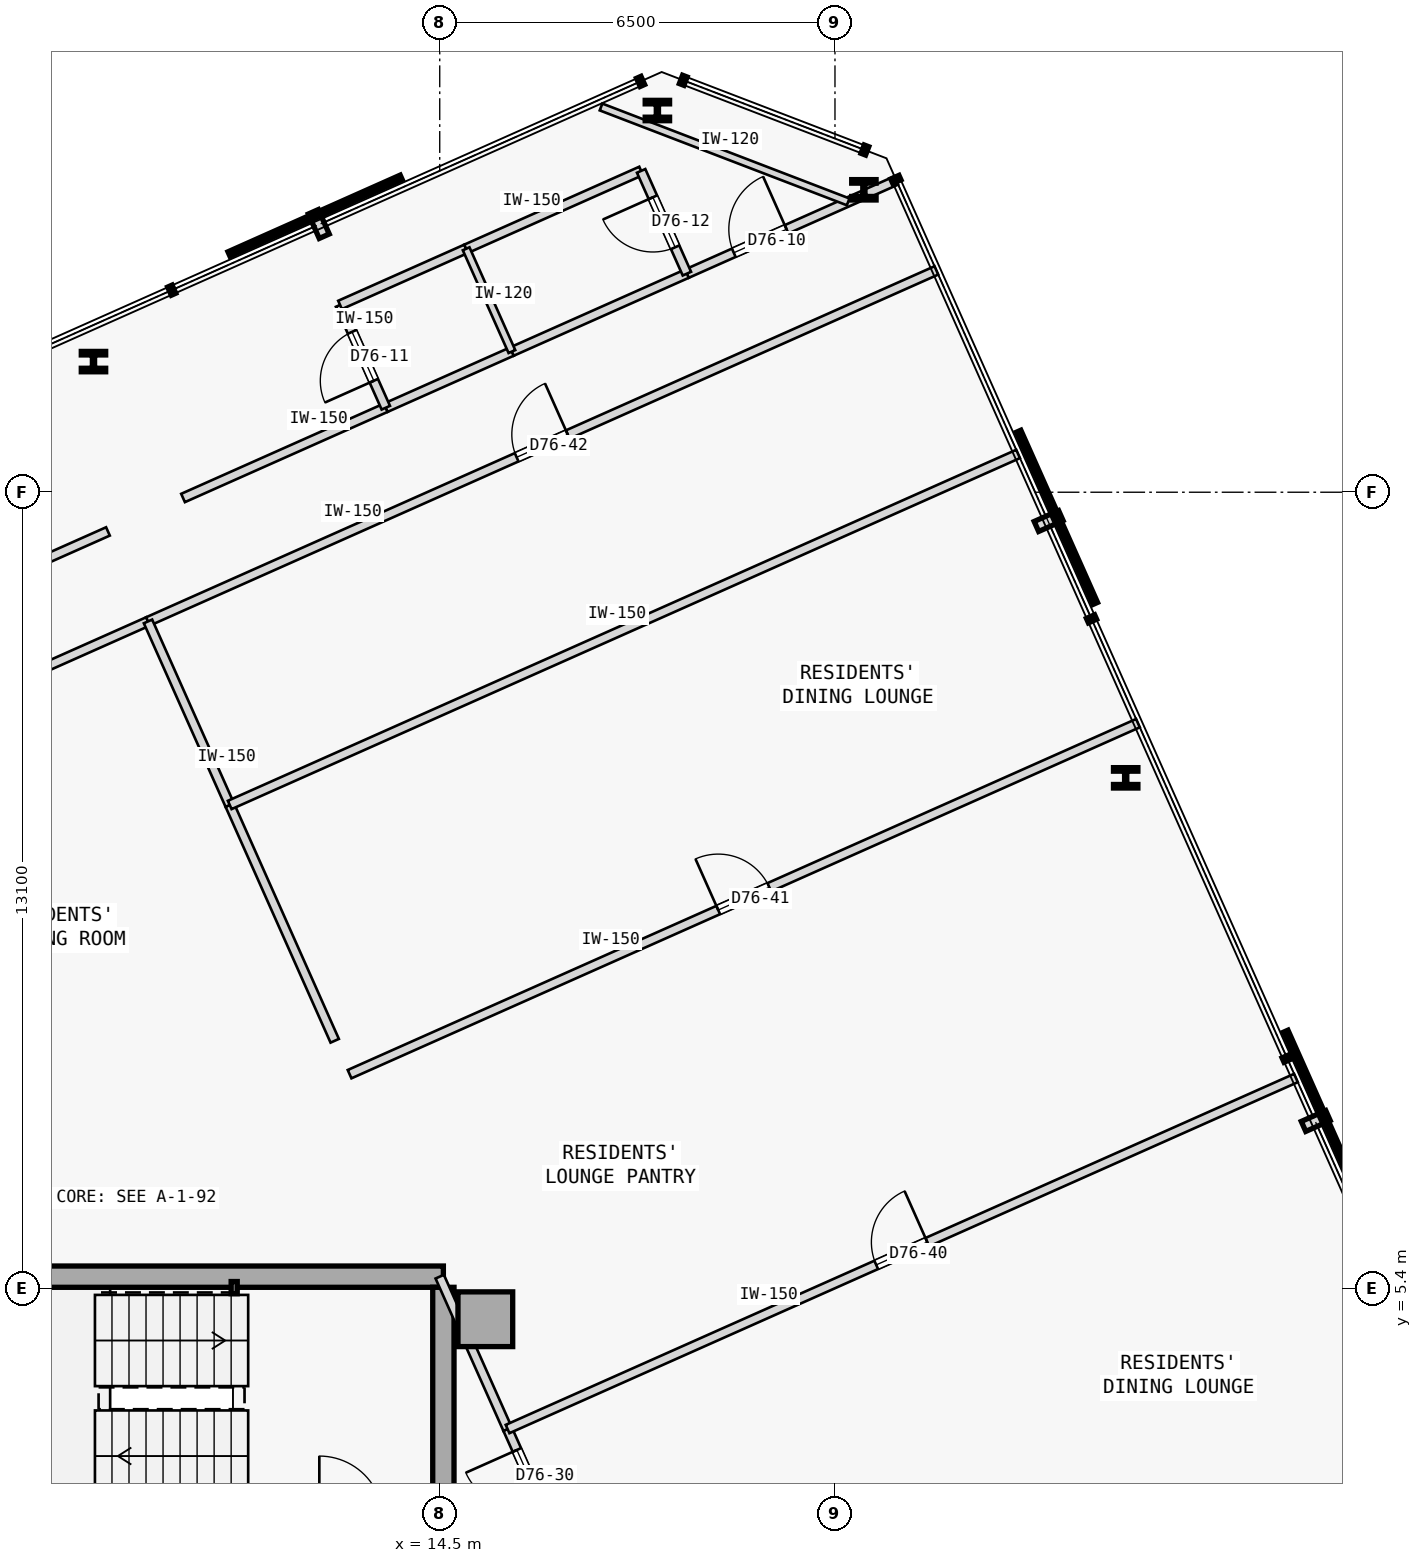
"""IFC4 building model, lengths in metres.
Left out: names, types, materials, properties, quantities, classifications, styles, units other than length and angle.
Written with IfcOpenShell. Run it as: python <this file> out.ifc"""

import sys

from ifc_helpers import new_model, si_unit, direction, frame, frame_2d, origin, origin_2d, place, context, subcontext, project, spatial, rectangle, hollow_rectangle, i_section, extrude, element, fill, save


model = new_model("IFC4")
c1 = context("Model", 3, precision=1e-05, world=origin(), true_north=direction((0.0, 1.0)))
c2 = subcontext(c1, "Body", "Model", "MODEL_VIEW")
j1 = project(units=[si_unit("LENGTHUNIT", "METRE"), si_unit("PLANEANGLEUNIT", "RADIAN")], contexts=[c1])
p1 = place(None, origin())
s1 = spatial("IfcSite", under=j1, at=p1, CompositionType="ELEMENT")
p2 = place(p1, origin())
s2 = spatial("IfcBuilding", under=s1, at=p2, CompositionType="ELEMENT")
p3 = place(p2, frame((0.0, 0.0, 285.25)))
s3 = spatial("IfcBuildingStorey", under=s2, at=p3, CompositionType="ELEMENT", Elevation=285.25)
p4 = place(p3, frame((15.25, 4.9, 0.0), z_axis=(0.0, 0.0, 1.0), x_axis=(1.0, 0.0, 0.0)))
e1 = element("IfcColumn", 1, at=p4, inside=s3, PredefinedType="COLUMN", context=c2, shape_type="SweptSolid", body=[
    extrude(rectangle(XDim=0.9, YDim=0.9, at=origin_2d()), origin(), (0.0, 0.0, 1.0), 3.35),
])
p5 = place(p3, frame((3.15, 5.6, 0.0), z_axis=(0.0, 0.0, 1.0), x_axis=(1.0, 0.0, 0.0)))
e2 = element("IfcWall", 2, at=p5, inside=s3, PredefinedType="SHEAR", context=c2, shape_type="SweptSolid", body=[
    extrude(rectangle(XDim=11.41, YDim=0.35, at=frame_2d((5.705, 0.0))), origin(), (0.0, 0.0, 1.0), 3.125),
])
p6 = place(p3, frame((14.56, -5.425, 0.0), z_axis=(0.0, 0.0, 1.0), x_axis=(0.0, 1.0, 0.0)))
e3 = element("IfcWall", 3, at=p6, inside=s3, PredefinedType="SHEAR", context=c2, shape_type="SweptSolid", body=[
    extrude(rectangle(XDim=10.85, YDim=0.35, at=frame_2d((5.425, 0.0))), origin(), (0.0, 0.0, 1.0), 3.125),
])
p7 = place(p3, frame((11.12, 5.42, 0.0), z_axis=(0.0, 0.0, 1.0), x_axis=(1.0, 0.0, 0.0)))
e4 = element("IfcColumn", 4, at=p7, inside=s3, PredefinedType="COLUMN", context=c2, shape_type="SweptSolid", body=[
    extrude(hollow_rectangle(XDim=0.1, YDim=0.2, WallThickness=0.008, at=origin_2d()), origin(), (0.0, 0.0, 1.0), 3.35),
])
for number, where, z_axis, x_axis in (
    (5, (25.781, 13.803, 0.0), (0.0, 0.0, 1.0), (1.0, 0.0, 0.0)),
    (6, (21.476, 23.473, 0.0), (0.0, 0.0, 1.0), (1.0, 0.0, 0.0)),
    (7, (18.08, 24.777, 0.0), (0.0, 0.0, 1.0), (1.0, 0.0, 0.0)),
    (8, (8.806, 20.648, 0.0), (0.0, 0.0, 1.0), (1.0, 0.0, 0.0)),
):
    element("IfcColumn", number, at=place(p3, frame(where, z_axis=z_axis, x_axis=x_axis)), inside=s3, PredefinedType="COLUMN", context=c2, shape_type="SweptSolid", body=[
        extrude(i_section(OverallWidth=0.401, OverallDepth=0.335, WebThickness=0.036, FlangeThickness=0.058, FilletRadius=0.015, at=origin_2d()), origin(), (0.0, 0.0, 1.0), 3.35),
    ])
p8 = place(p3, frame((10.279, 18.405, 0.0), z_axis=(0.0, 0.0, 1.0), x_axis=(0.913543802, 0.40674036169, 0.0)))
e9 = element("IfcWall", 9, at=p8, inside=s3, PredefinedType="PARTITIONING", context=c2, shape_type="SweptSolid", body=[
    extrude(rectangle(XDim=3.65, YDim=0.15, at=frame_2d((1.825, 0.0))), origin(), (0.0, 0.0, 1.0), 3.125),
])
p9 = place(p3, frame((18.565, 22.094, 0.0), z_axis=(0.0, 0.0, 1.0), x_axis=(0.913565694971, 0.406691186249, 0.0)))
e10 = element("IfcWall", 10, at=p9, inside=s3, PredefinedType="PARTITIONING", context=c2, shape_type="SweptSolid", body=[
    extrude(rectangle(XDim=3.77, YDim=0.15, at=frame_2d((1.885, 0.0))), origin(), (0.0, 0.0, 1.0), 3.125),
])
p10 = place(p9, frame((0.844, 0.0, 0.0)))
e11 = element("IfcOpeningElement", 11, at=p10, cuts=e10, PredefinedType="OPENING", context=c2, shape_type="SweptSolid", body=[
    extrude(rectangle(XDim=0.95, YDim=2.15, at=frame_2d((0.475, 1.075))), frame((0.0, 0.085, 0.0), z_axis=(0.0, -1.0, 0.0), x_axis=(1.0, 0.0, 0.0)), (0.0, 0.0, 1.0), 0.17),
])
p11 = place(p3, frame((13.613, 19.89, 0.0), z_axis=(0.0, 0.0, 1.0), x_axis=(0.913536363976, 0.406757067172, 0.0)))
e12 = element("IfcWall", 12, at=p11, inside=s3, PredefinedType="PARTITIONING", context=c2, shape_type="SweptSolid", body=[
    extrude(rectangle(XDim=2.27, YDim=0.15, at=frame_2d((1.135, 0.0))), origin(), (0.0, 0.0, 1.0), 3.125),
])
p12 = place(p3, frame((15.687, 20.813, 0.0), z_axis=(0.0, 0.0, 1.0), x_axis=(0.913542880558, 0.406742431252, 0.0)))
e13 = element("IfcWall", 13, at=p12, inside=s3, PredefinedType="PARTITIONING", context=c2, shape_type="SweptSolid", body=[
    extrude(rectangle(XDim=3.15, YDim=0.15, at=frame_2d((1.575, 0.0))), origin(), (0.0, 0.0, 1.0), 3.125),
])
p13 = place(p3, frame((3.7, 13.703, 0.0), z_axis=(0.0, 0.0, 1.0), x_axis=(0.913549363376, 0.406727870542, 0.0)))
e14 = element("IfcWall", 14, at=p13, inside=s3, PredefinedType="PARTITIONING", context=c2, shape_type="SweptSolid", body=[
    extrude(rectangle(XDim=6.571, YDim=0.15, at=frame_2d((3.286, 0.0))), origin(), (0.0, 0.0, 1.0), 3.125),
])
p14 = place(p3, frame((-9.109, 9.773, 0.0), z_axis=(0.0, 0.0, 1.0), x_axis=(0.913545361298, 0.406736859469, 0.0)))
e15 = element("IfcWall", 15, at=p14, inside=s3, PredefinedType="PARTITIONING", context=c2, shape_type="SweptSolid", body=[
    extrude(rectangle(XDim=19.871, YDim=0.15, at=frame_2d((9.936, 0.0))), origin(), (0.0, 0.0, 1.0), 3.125),
])
p15 = place(p14, frame((9.476, 0.0, 0.0)))
e16 = element("IfcOpeningElement", 16, at=p15, cuts=e15, PredefinedType="OPENING", context=c2, shape_type="SweptSolid", body=[
    extrude(rectangle(XDim=0.92, YDim=2.15, at=frame_2d((0.46, 1.075))), frame((0.0, 0.085, 0.0), z_axis=(0.0, -1.0, 0.0), x_axis=(1.0, 0.0, 0.0)), (0.0, 0.0, 1.0), 0.17),
])
p16 = place(p3, frame((9.703, 16.375, 0.0), z_axis=(0.0, 0.0, 1.0), x_axis=(0.913544622417, 0.406738519018, 0.0)))
e17 = element("IfcWall", 17, at=p16, inside=s3, PredefinedType="PARTITIONING", context=c2, shape_type="SweptSolid", body=[
    extrude(rectangle(XDim=14.192, YDim=0.15, at=frame_2d((7.096, 0.0))), origin(), (0.0, 0.0, 1.0), 3.125),
])
p17 = place(p16, frame((6.636, 0.0, 0.0)))
e18 = element("IfcOpeningElement", 18, at=p17, cuts=e17, PredefinedType="OPENING", context=c2, shape_type="SweptSolid", body=[
    extrude(rectangle(XDim=0.92, YDim=2.15, at=frame_2d((0.46, 1.075))), frame((0.0, 0.085, 0.0), z_axis=(0.0, -1.0, 0.0), x_axis=(1.0, 0.0, 0.0)), (0.0, 0.0, 1.0), 0.17),
])
p18 = place(p3, frame((13.613, 19.89, 0.0), z_axis=(0.0, 0.0, 1.0), x_axis=(-0.406701600856, 0.913561058639, 0.0)))
e19 = element("IfcWall", 19, at=p18, inside=s3, PredefinedType="PARTITIONING", context=c2, shape_type="SweptSolid", body=[
    extrude(rectangle(XDim=1.85, YDim=0.15, at=frame_2d((0.925, 0.0))), origin(), (0.0, 0.0, 1.0), 3.125),
])
p19 = place(p18, frame((0.485, 0.0, 0.0)))
e20 = element("IfcOpeningElement", 20, at=p19, cuts=e19, PredefinedType="OPENING", context=c2, shape_type="SweptSolid", body=[
    extrude(rectangle(XDim=0.88, YDim=2.15, at=frame_2d((0.44, 1.075))), frame((0.0, 0.085, 0.0), z_axis=(0.0, -1.0, 0.0), x_axis=(1.0, 0.0, 0.0)), (0.0, 0.0, 1.0), 0.17),
])
p20 = place(p3, frame((12.861, 21.58, 0.0), z_axis=(0.0, 0.0, 1.0), x_axis=(0.913536363976, 0.406757067172, 0.0)))
e21 = element("IfcWall", 21, at=p20, inside=s3, PredefinedType="PARTITIONING", context=c2, shape_type="SweptSolid", body=[
    extrude(rectangle(XDim=2.27, YDim=0.15, at=frame_2d((1.135, 0.0))), origin(), (0.0, 0.0, 1.0), 3.125),
])
p21 = place(p3, frame((14.935, 22.503, 0.0), z_axis=(0.0, 0.0, 1.0), x_axis=(0.913571677955, 0.406677746181, 0.0)))
e22 = element("IfcWall", 22, at=p21, inside=s3, PredefinedType="PARTITIONING", context=c2, shape_type="SweptSolid", body=[
    extrude(rectangle(XDim=3.15, YDim=0.15, at=frame_2d((1.575, 0.0))), origin(), (0.0, 0.0, 1.0), 3.125),
])
p22 = place(p3, frame((18.565, 22.094, 0.0), z_axis=(0.0, 0.0, 1.0), x_axis=(-0.406750635596, 0.913539227643, 0.0)))
e23 = element("IfcWall", 23, at=p22, inside=s3, PredefinedType="PARTITIONING", context=c2, shape_type="SweptSolid", body=[
    extrude(rectangle(XDim=1.85, YDim=0.15, at=frame_2d((0.925, 0.0))), origin(), (0.0, 0.0, 1.0), 3.125),
])
p23 = place(p22, frame((0.475, 0.0, 0.0)))
e24 = element("IfcOpeningElement", 24, at=p23, cuts=e23, PredefinedType="OPENING", context=c2, shape_type="SweptSolid", body=[
    extrude(rectangle(XDim=0.9, YDim=2.15, at=frame_2d((0.45, 1.075))), frame((0.0, 0.085, 0.0), z_axis=(0.0, -1.0, 0.0), x_axis=(1.0, 0.0, 0.0)), (0.0, 0.0, 1.0), 0.17),
])
p24 = place(p3, frame((15.687, 20.813, 0.0), z_axis=(0.0, 0.0, 1.0), x_axis=(-0.406701600856, 0.913561058639, 0.0)))
e25 = element("IfcWall", 25, at=p24, inside=s3, PredefinedType="PARTITIONING", context=c2, shape_type="SweptSolid", body=[
    extrude(rectangle(XDim=1.85, YDim=0.12, at=frame_2d((0.925, 0.0))), origin(), (0.0, 0.0, 1.0), 3.125),
])
p25 = place(p3, frame((17.163, -0.382, 0.0), z_axis=(0.0, 0.0, 1.0), x_axis=(-0.406727752939, 0.913549415735, 0.0)))
e26 = element("IfcWall", 26, at=p25, inside=s3, PredefinedType="PARTITIONING", context=c2, shape_type="SweptSolid", body=[
    extrude(rectangle(XDim=3.805, YDim=0.15, at=frame_2d((1.902, 0.0))), origin(), (0.0, 0.0, 1.0), 3.125),
])
p26 = place(p25, frame((2.508, 0.0, 0.0)))
e27 = element("IfcOpeningElement", 27, at=p26, cuts=e26, PredefinedType="OPENING", context=c2, shape_type="SweptSolid", body=[
    extrude(rectangle(XDim=0.92, YDim=2.15, at=frame_2d((0.46, 1.075))), frame((0.0, 0.085, 0.0), z_axis=(0.0, -1.0, 0.0), x_axis=(1.0, 0.0, 0.0)), (0.0, 0.0, 1.0), 0.17),
])
p27 = place(p3, frame((15.616, 3.094, 0.0), z_axis=(0.0, 0.0, 1.0), x_axis=(-0.406782551453, 0.913525016534, 0.0)))
e28 = element("IfcWall", 28, at=p27, inside=s3, PredefinedType="PARTITIONING", context=c2, shape_type="SweptSolid", body=[
    extrude(rectangle(XDim=2.743, YDim=0.15, at=frame_2d((1.372, 0.0))), origin(), (0.0, 0.0, 1.0), 3.125),
])
p28 = place(p3, frame((12.773, 9.479, 0.0), z_axis=(0.0, 0.0, 1.0), x_axis=(-0.406762672331, 0.913533868227, 0.0)))
e29 = element("IfcWall", 29, at=p28, inside=s3, PredefinedType="PARTITIONING", context=c2, shape_type="SweptSolid", body=[
    extrude(rectangle(XDim=4.245, YDim=0.15, at=frame_2d((2.123, 0.0))), origin(), (0.0, 0.0, 1.0), 3.125),
])
p29 = place(p3, frame((11.046, 13.357, 0.0), z_axis=(0.0, 0.0, 1.0), x_axis=(-0.406714303965, 0.913555403328, 0.0)))
e30 = element("IfcWall", 30, at=p29, inside=s3, PredefinedType="PARTITIONING", context=c2, shape_type="SweptSolid", body=[
    extrude(rectangle(XDim=3.304, YDim=0.15, at=frame_2d((1.652, 0.0))), origin(), (0.0, 0.0, 1.0), 3.125),
])
p30 = place(p3, frame((15.616, 3.094, 0.0), z_axis=(0.0, 0.0, 1.0), x_axis=(0.913551014388, 0.406724162191, 0.0)))
e31 = element("IfcWall", 31, at=p30, inside=s3, PredefinedType="PARTITIONING", context=c2, shape_type="SweptSolid", body=[
    extrude(rectangle(XDim=14.192, YDim=0.15, at=frame_2d((7.096, 0.0))), origin(), (0.0, 0.0, 1.0), 3.125),
])
p31 = place(p30, frame((6.636, 0.0, 0.0)))
e32 = element("IfcOpeningElement", 32, at=p31, cuts=e31, PredefinedType="OPENING", context=c2, shape_type="SweptSolid", body=[
    extrude(rectangle(XDim=0.92, YDim=2.15, at=frame_2d((0.46, 1.075))), frame((0.0, 0.085, 0.0), z_axis=(0.0, -1.0, 0.0), x_axis=(1.0, 0.0, 0.0)), (0.0, 0.0, 1.0), 0.17),
])
p32 = place(p3, frame((13.018, 8.93, 0.0), z_axis=(0.0, 0.0, 1.0), x_axis=(0.913551014388, 0.406724162191, 0.0)))
e33 = element("IfcWall", 33, at=p32, inside=s3, PredefinedType="PARTITIONING", context=c2, shape_type="SweptSolid", body=[
    extrude(rectangle(XDim=14.192, YDim=0.15, at=frame_2d((7.096, 0.0))), origin(), (0.0, 0.0, 1.0), 3.125),
])
p33 = place(p32, frame((6.636, 0.0, 0.0)))
e34 = element("IfcOpeningElement", 34, at=p33, cuts=e33, PredefinedType="OPENING", context=c2, shape_type="SweptSolid", body=[
    extrude(rectangle(XDim=0.92, YDim=2.15, at=frame_2d((0.46, 1.075))), frame((0.0, 0.085, 0.0), z_axis=(0.0, -1.0, 0.0), x_axis=(1.0, 0.0, 0.0)), (0.0, 0.0, 1.0), 0.17),
])
p34 = place(p3, frame((11.046, 13.357, 0.0), z_axis=(0.0, 0.0, 1.0), x_axis=(0.913553860075, 0.406717770379, 0.0)))
e35 = element("IfcWall", 35, at=p34, inside=s3, PredefinedType="PARTITIONING", context=c2, shape_type="SweptSolid", body=[
    extrude(rectangle(XDim=14.192, YDim=0.15, at=frame_2d((7.096, 0.0))), origin(), (0.0, 0.0, 1.0), 3.125),
])
p35 = place(p3, frame((21.217, 23.275, 0.0), z_axis=(0.0, 0.0, 1.0), x_axis=(-0.933583889907, 0.358358926924, 0.0)))
e36 = element("IfcWall", 36, at=p35, inside=s3, PredefinedType="PARTITIONING", context=c2, shape_type="SweptSolid", body=[
    extrude(rectangle(XDim=4.353, YDim=0.12, at=frame_2d((2.177, 0.0))), origin(), (0.0, 0.0, 1.0), 3.125),
])
p36 = place(p10, origin())
e37 = element("IfcDoor", 37, at=p36, inside=s3, OperationType="SINGLE_SWING_RIGHT", PredefinedType="DOOR", context=c2, shape_type="SweptSolid", body=[
    extrude(rectangle(XDim=0.95, YDim=2.15, at=frame_2d((0.475, 1.075))), frame((0.0, 0.025, 0.0), z_axis=(0.0, -1.0, 0.0), x_axis=(1.0, 0.0, 0.0)), (0.0, 0.0, 1.0), 0.05),
])
fill(e11, e37)
p37 = place(p19, origin())
e38 = element("IfcDoor", 38, at=p37, inside=s3, OperationType="SINGLE_SWING_LEFT", PredefinedType="DOOR", context=c2, shape_type="SweptSolid", body=[
    extrude(rectangle(XDim=0.88, YDim=2.15, at=frame_2d((0.44, 1.075))), frame((0.0, 0.025, 0.0), z_axis=(0.0, -1.0, 0.0), x_axis=(1.0, 0.0, 0.0)), (0.0, 0.0, 1.0), 0.05),
])
fill(e20, e38)
p38 = place(p23, origin())
e39 = element("IfcDoor", 39, at=p38, inside=s3, OperationType="SINGLE_SWING_RIGHT", PredefinedType="DOOR", context=c2, shape_type="SweptSolid", body=[
    extrude(rectangle(XDim=0.9, YDim=2.15, at=frame_2d((0.45, 1.075))), frame((0.0, 0.025, 0.0), z_axis=(0.0, -1.0, 0.0), x_axis=(1.0, 0.0, 0.0)), (0.0, 0.0, 1.0), 0.05),
])
fill(e24, e39)
p39 = place(p26, origin())
e40 = element("IfcDoor", 40, at=p39, inside=s3, OperationType="SINGLE_SWING_RIGHT", PredefinedType="DOOR", context=c2, shape_type="SweptSolid", body=[
    extrude(rectangle(XDim=0.92, YDim=2.15, at=frame_2d((0.46, 1.075))), frame((0.0, 0.025, 0.0), z_axis=(0.0, -1.0, 0.0), x_axis=(1.0, 0.0, 0.0)), (0.0, 0.0, 1.0), 0.05),
])
fill(e27, e40)
p40 = place(p31, origin())
e41 = element("IfcDoor", 41, at=p40, inside=s3, OperationType="SINGLE_SWING_RIGHT", PredefinedType="DOOR", context=c2, shape_type="SweptSolid", body=[
    extrude(rectangle(XDim=0.92, YDim=2.15, at=frame_2d((0.46, 1.075))), frame((0.0, 0.025, 0.0), z_axis=(0.0, -1.0, 0.0), x_axis=(1.0, 0.0, 0.0)), (0.0, 0.0, 1.0), 0.05),
])
fill(e32, e41)
p41 = place(p33, origin())
e42 = element("IfcDoor", 42, at=p41, inside=s3, OperationType="SINGLE_SWING_LEFT", PredefinedType="DOOR", context=c2, shape_type="SweptSolid", body=[
    extrude(rectangle(XDim=0.92, YDim=2.15, at=frame_2d((0.46, 1.075))), frame((0.0, 0.025, 0.0), z_axis=(0.0, -1.0, 0.0), x_axis=(1.0, 0.0, 0.0)), (0.0, 0.0, 1.0), 0.05),
])
fill(e34, e42)
p42 = place(p17, origin())
e43 = element("IfcDoor", 43, at=p42, inside=s3, OperationType="SINGLE_SWING_RIGHT", PredefinedType="DOOR", context=c2, shape_type="SweptSolid", body=[
    extrude(rectangle(XDim=0.92, YDim=2.15, at=frame_2d((0.46, 1.075))), frame((0.0, 0.025, 0.0), z_axis=(0.0, -1.0, 0.0), x_axis=(1.0, 0.0, 0.0)), (0.0, 0.0, 1.0), 0.05),
])
fill(e18, e43)
save(model, sys.argv[1])
